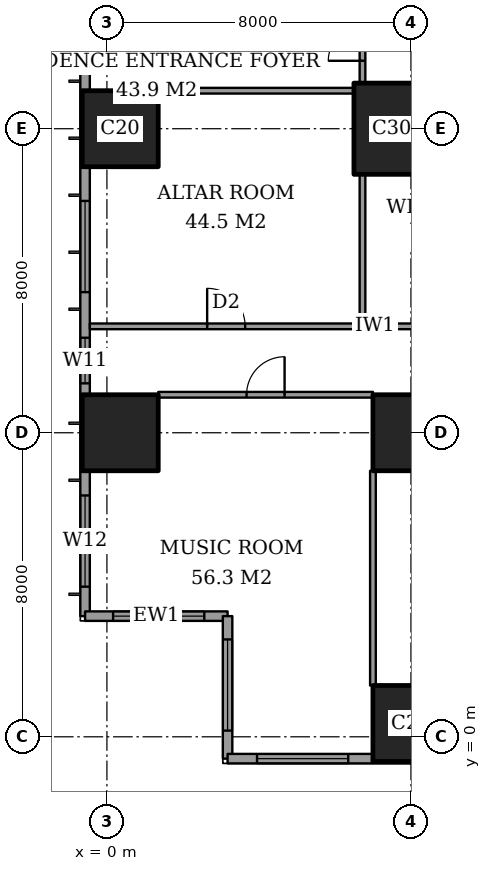
"""IFC4 building model, lengths in metres.
Left out: names, types, materials, properties, quantities, classifications, styles, units other than length and angle.
Written with IfcOpenShell. Run it as: python <this file> out.ifc"""

import sys

from ifc_helpers import new_model, si_unit, direction, frame, frame_2d, origin, origin_2d, place, context, subcontext, project, spatial, rectangle, extrude, element, fill, save


model = new_model("IFC4")
c1 = context("Model", 3, precision=1e-05, world=origin(), true_north=direction((0.0, 1.0)))
c2 = subcontext(c1, "Body", "Model", "MODEL_VIEW")
j1 = project(units=[si_unit("LENGTHUNIT", "METRE"), si_unit("PLANEANGLEUNIT", "RADIAN")], contexts=[c1])
p1 = place(None, origin())
s1 = spatial("IfcSite", under=j1, at=p1, CompositionType="ELEMENT")
p2 = place(p1, origin())
s2 = spatial("IfcBuilding", under=s1, at=p2, CompositionType="ELEMENT")
p3 = place(p2, frame((0.0, 0.0, 96.2)))
s3 = spatial("IfcBuildingStorey", under=s2, at=p3, CompositionType="ELEMENT", Elevation=96.2)
for number, where, z_axis, x_axis in (
    (1, (0.35, 8.0, 0.0), (0.0, 0.0, 1.0), (1.0, 0.0, 0.0)),
    (2, (0.35, 16.0, 0.0), (0.0, 0.0, 1.0), (1.0, 0.0, 0.0)),
    (3, (8.0, 0.35, 0.0), (0.0, 0.0, 1.0), (1.0, 0.0, 0.0)),
    (4, (8.0, 8.0, 0.0), (0.0, 0.0, 1.0), (1.0, 0.0, 0.0)),
):
    element("IfcColumn", number, at=place(p3, frame(where, z_axis=z_axis, x_axis=x_axis)), inside=s3, PredefinedType="COLUMN", context=c2, shape_type="SweptSolid", body=[
        extrude(rectangle(XDim=2.0, YDim=2.0, at=origin_2d()), origin(), (0.0, 0.0, 1.0), 3.6),
    ])
p4 = place(p3, frame((8.0, 16.0, 0.0), z_axis=(0.0, 0.0, 1.0), x_axis=(1.0, 0.0, 0.0)))
e5 = element("IfcColumn", 5, at=p4, inside=s3, PredefinedType="COLUMN", context=c2, shape_type="SweptSolid", body=[
    extrude(rectangle(XDim=3.0, YDim=2.4, at=origin_2d()), origin(), (0.0, 0.0, 1.0), 3.6),
])
p5 = place(p3, frame((-0.575, 44.825, 0.0), z_axis=(0.0, 0.0, 1.0), x_axis=(0.0, -1.0, 0.0)))
e6 = element("IfcWall", 6, at=p5, inside=s3, PredefinedType="SOLIDWALL", context=c2, shape_type="SweptSolid", body=[
    extrude(rectangle(XDim=41.65, YDim=0.25, at=frame_2d((20.825, 0.0))), origin(), (0.0, 0.0, 1.0), 3.6),
])
p6 = place(p5, frame((0.775, 0.0, 0.4)))
e7 = element("IfcOpeningElement", 7, at=p6, cuts=e6, PredefinedType="OPENING", context=c2, shape_type="SweptSolid", body=[
    extrude(rectangle(XDim=2.4, YDim=2.2, at=frame_2d((1.2, 1.1))), frame((0.0, 0.135, 0.0), z_axis=(0.0, -1.0, 0.0), x_axis=(1.0, 0.0, 0.0)), (0.0, 0.0, 1.0), 0.27),
])
p7 = place(p5, frame((6.1, 0.0, 0.4)))
e8 = element("IfcOpeningElement", 8, at=p7, cuts=e6, PredefinedType="OPENING", context=c2, shape_type="SweptSolid", body=[
    extrude(rectangle(XDim=1.2, YDim=2.2, at=frame_2d((0.6, 1.1))), frame((0.0, 0.135, 0.0), z_axis=(0.0, -1.0, 0.0), x_axis=(1.0, 0.0, 0.0)), (0.0, 0.0, 1.0), 0.27),
])
p8 = place(p5, frame((8.425, 0.0, 0.4)))
e9 = element("IfcOpeningElement", 9, at=p8, cuts=e6, PredefinedType="OPENING", context=c2, shape_type="SweptSolid", body=[
    extrude(rectangle(XDim=2.4, YDim=2.2, at=frame_2d((1.2, 1.1))), frame((0.0, 0.135, 0.0), z_axis=(0.0, -1.0, 0.0), x_axis=(1.0, 0.0, 0.0)), (0.0, 0.0, 1.0), 0.27),
])
p9 = place(p5, frame((15.625, 0.0, 0.4)))
e10 = element("IfcOpeningElement", 10, at=p9, cuts=e6, PredefinedType="OPENING", context=c2, shape_type="SweptSolid", body=[
    extrude(rectangle(XDim=2.4, YDim=2.2, at=frame_2d((1.2, 1.1))), frame((0.0, 0.135, 0.0), z_axis=(0.0, -1.0, 0.0), x_axis=(1.0, 0.0, 0.0)), (0.0, 0.0, 1.0), 0.27),
])
p10 = place(p5, frame((23.625, 0.0, 0.4)))
e11 = element("IfcOpeningElement", 11, at=p10, cuts=e6, PredefinedType="OPENING", context=c2, shape_type="SweptSolid", body=[
    extrude(rectangle(XDim=2.4, YDim=2.2, at=frame_2d((1.2, 1.1))), frame((0.0, 0.135, 0.0), z_axis=(0.0, -1.0, 0.0), x_axis=(1.0, 0.0, 0.0)), (0.0, 0.0, 1.0), 0.27),
])
p11 = place(p5, frame((30.725, 0.0, 0.4)))
e12 = element("IfcOpeningElement", 12, at=p11, cuts=e6, PredefinedType="OPENING", context=c2, shape_type="SweptSolid", body=[
    extrude(rectangle(XDim=2.4, YDim=2.2, at=frame_2d((1.2, 1.1))), frame((0.0, 0.135, 0.0), z_axis=(0.0, -1.0, 0.0), x_axis=(1.0, 0.0, 0.0)), (0.0, 0.0, 1.0), 0.27),
])
p12 = place(p5, frame((34.325, 0.0, 0.4)))
e13 = element("IfcOpeningElement", 13, at=p12, cuts=e6, PredefinedType="OPENING", context=c2, shape_type="SweptSolid", body=[
    extrude(rectangle(XDim=1.2, YDim=2.2, at=frame_2d((0.6, 1.1))), frame((0.0, 0.135, 0.0), z_axis=(0.0, -1.0, 0.0), x_axis=(1.0, 0.0, 0.0)), (0.0, 0.0, 1.0), 0.27),
])
p13 = place(p5, frame((38.475, 0.0, 0.4)))
e14 = element("IfcOpeningElement", 14, at=p13, cuts=e6, PredefinedType="OPENING", context=c2, shape_type="SweptSolid", body=[
    extrude(rectangle(XDim=2.4, YDim=2.2, at=frame_2d((1.2, 1.1))), frame((0.0, 0.135, 0.0), z_axis=(0.0, -1.0, 0.0), x_axis=(1.0, 0.0, 0.0)), (0.0, 0.0, 1.0), 0.27),
])
p14 = place(p3, frame((-0.575, 3.175, 0.0), z_axis=(0.0, 0.0, 1.0), x_axis=(1.0, 0.0, 0.0)))
e15 = element("IfcWall", 15, at=p14, inside=s3, PredefinedType="SOLIDWALL", context=c2, shape_type="SweptSolid", body=[
    extrude(rectangle(XDim=3.75, YDim=0.25, at=frame_2d((1.875, 0.0))), origin(), (0.0, 0.0, 1.0), 3.6),
])
p15 = place(p14, frame((0.738, 0.0, 0.4)))
e16 = element("IfcOpeningElement", 16, at=p15, cuts=e15, PredefinedType="OPENING", context=c2, shape_type="SweptSolid", body=[
    extrude(rectangle(XDim=2.4, YDim=2.2, at=frame_2d((1.2, 1.1))), frame((0.0, 0.135, 0.0), z_axis=(0.0, -1.0, 0.0), x_axis=(1.0, 0.0, 0.0)), (0.0, 0.0, 1.0), 0.27),
])
p16 = place(p3, frame((3.175, 3.175, 0.0), z_axis=(0.0, 0.0, 1.0), x_axis=(0.0, -1.0, 0.0)))
e17 = element("IfcWall", 17, at=p16, inside=s3, PredefinedType="SOLIDWALL", context=c2, shape_type="SweptSolid", body=[
    extrude(rectangle(XDim=3.75, YDim=0.25, at=frame_2d((1.875, 0.0))), origin(), (0.0, 0.0, 1.0), 3.6),
])
p17 = place(p16, frame((0.613, 0.0, 0.4)))
e18 = element("IfcOpeningElement", 18, at=p17, cuts=e17, PredefinedType="OPENING", context=c2, shape_type="SweptSolid", body=[
    extrude(rectangle(XDim=2.4, YDim=2.2, at=frame_2d((1.2, 1.1))), frame((0.0, 0.135, 0.0), z_axis=(0.0, -1.0, 0.0), x_axis=(1.0, 0.0, 0.0)), (0.0, 0.0, 1.0), 0.27),
])
p18 = place(p3, frame((3.175, -0.575, 0.0), z_axis=(0.0, 0.0, 1.0), x_axis=(1.0, 0.0, 0.0)))
e19 = element("IfcWall", 19, at=p18, inside=s3, PredefinedType="SOLIDWALL", context=c2, shape_type="SweptSolid", body=[
    extrude(rectangle(XDim=21.4, YDim=0.25, at=frame_2d((10.7, 0.0))), origin(), (0.0, 0.0, 1.0), 3.6),
])
p19 = place(p18, frame((0.775, 0.0, 0.4)))
e20 = element("IfcOpeningElement", 20, at=p19, cuts=e19, PredefinedType="OPENING", context=c2, shape_type="SweptSolid", body=[
    extrude(rectangle(XDim=2.4, YDim=2.2, at=frame_2d((1.2, 1.1))), frame((0.0, 0.135, 0.0), z_axis=(0.0, -1.0, 0.0), x_axis=(1.0, 0.0, 0.0)), (0.0, 0.0, 1.0), 0.27),
])
p20 = place(p18, frame((7.125, 0.0, 0.4)))
e21 = element("IfcOpeningElement", 21, at=p20, cuts=e19, PredefinedType="OPENING", context=c2, shape_type="SweptSolid", body=[
    extrude(rectangle(XDim=2.4, YDim=2.2, at=frame_2d((1.2, 1.1))), frame((0.0, 0.135, 0.0), z_axis=(0.0, -1.0, 0.0), x_axis=(1.0, 0.0, 0.0)), (0.0, 0.0, 1.0), 0.27),
])
p21 = place(p18, frame((14.225, 0.0, 0.4)))
e22 = element("IfcOpeningElement", 22, at=p21, cuts=e19, PredefinedType="OPENING", context=c2, shape_type="SweptSolid", body=[
    extrude(rectangle(XDim=1.2, YDim=2.2, at=frame_2d((0.6, 1.1))), frame((0.0, 0.135, 0.0), z_axis=(0.0, -1.0, 0.0), x_axis=(1.0, 0.0, 0.0)), (0.0, 0.0, 1.0), 0.27),
])
p22 = place(p18, frame((16.1, 0.0, 0.4)))
e23 = element("IfcOpeningElement", 23, at=p22, cuts=e19, PredefinedType="OPENING", context=c2, shape_type="SweptSolid", body=[
    extrude(rectangle(XDim=1.2, YDim=2.2, at=frame_2d((0.6, 1.1))), frame((0.0, 0.135, 0.0), z_axis=(0.0, -1.0, 0.0), x_axis=(1.0, 0.0, 0.0)), (0.0, 0.0, 1.0), 0.27),
])
p23 = place(p18, frame((17.85, 0.0, 0.4)))
e24 = element("IfcOpeningElement", 24, at=p23, cuts=e19, PredefinedType="OPENING", context=c2, shape_type="SweptSolid", body=[
    extrude(rectangle(XDim=1.2, YDim=2.2, at=frame_2d((0.6, 1.1))), frame((0.0, 0.135, 0.0), z_axis=(0.0, -1.0, 0.0), x_axis=(1.0, 0.0, 0.0)), (0.0, 0.0, 1.0), 0.27),
])
p24 = place(p3, frame((1.35, 9.0, 0.0), z_axis=(0.0, 0.0, 1.0), x_axis=(1.0, 0.0, 0.0)))
e25 = element("IfcWall", 25, at=p24, inside=s3, PredefinedType="PARTITIONING", context=c2, shape_type="SweptSolid", body=[
    extrude(rectangle(XDim=5.65, YDim=0.15, at=frame_2d((2.825, 0.0))), origin(), (0.0, 0.0, 1.0), 3.35),
])
p25 = place(p24, frame((2.325, 0.0, 0.0)))
e26 = element("IfcOpeningElement", 26, at=p25, cuts=e25, PredefinedType="OPENING", context=c2, shape_type="SweptSolid", body=[
    extrude(rectangle(XDim=1.0, YDim=2.1, at=frame_2d((0.5, 1.05))), frame((0.0, 0.085, 0.0), z_axis=(0.0, -1.0, 0.0), x_axis=(1.0, 0.0, 0.0)), (0.0, 0.0, 1.0), 0.17),
])
p26 = place(p3, frame((-0.45, 10.8, 0.0), z_axis=(0.0, 0.0, 1.0), x_axis=(1.0, 0.0, 0.0)))
e27 = element("IfcWall", 27, at=p26, inside=s3, PredefinedType="PARTITIONING", context=c2, shape_type="SweptSolid", body=[
    extrude(rectangle(XDim=25.011, YDim=0.15, at=frame_2d((12.505, 0.0))), origin(), (0.0, 0.0, 1.0), 3.35),
])
p27 = place(p26, frame((12.05, 0.0, 0.0)))
e28 = element("IfcOpeningElement", 28, at=p27, cuts=e27, PredefinedType="OPENING", context=c2, shape_type="SweptSolid", body=[
    extrude(rectangle(XDim=1.0, YDim=2.1, at=frame_2d((0.5, 1.05))), frame((0.0, 0.085, 0.0), z_axis=(0.0, -1.0, 0.0), x_axis=(1.0, 0.0, 0.0)), (0.0, 0.0, 1.0), 0.17),
])
p28 = place(p26, frame((3.087, 0.0, 0.0)))
e29 = element("IfcOpeningElement", 29, at=p28, cuts=e27, PredefinedType="OPENING", context=c2, shape_type="SweptSolid", body=[
    extrude(rectangle(XDim=1.0, YDim=2.1, at=frame_2d((0.5, 1.05))), frame((0.0, 0.085, 0.0), z_axis=(0.0, -1.0, 0.0), x_axis=(1.0, 0.0, 0.0)), (0.0, 0.0, 1.0), 0.17),
])
p29 = place(p26, frame((8.863, 0.0, 0.0)))
e30 = element("IfcOpeningElement", 30, at=p29, cuts=e27, PredefinedType="OPENING", context=c2, shape_type="SweptSolid", body=[
    extrude(rectangle(XDim=0.9, YDim=2.1, at=frame_2d((0.45, 1.05))), frame((0.0, 0.085, 0.0), z_axis=(0.0, -1.0, 0.0), x_axis=(1.0, 0.0, 0.0)), (0.0, 0.0, 1.0), 0.17),
])
p30 = place(p26, frame((14.45, 0.0, 0.0)))
e31 = element("IfcOpeningElement", 31, at=p30, cuts=e27, PredefinedType="OPENING", context=c2, shape_type="SweptSolid", body=[
    extrude(rectangle(XDim=1.0, YDim=2.1, at=frame_2d((0.5, 1.05))), frame((0.0, 0.085, 0.0), z_axis=(0.0, -1.0, 0.0), x_axis=(1.0, 0.0, 0.0)), (0.0, 0.0, 1.0), 0.17),
])
p31 = place(p26, frame((16.9, 0.0, 0.0)))
e32 = element("IfcOpeningElement", 32, at=p31, cuts=e27, PredefinedType="OPENING", context=c2, shape_type="SweptSolid", body=[
    extrude(rectangle(XDim=0.9, YDim=2.1, at=frame_2d((0.45, 1.05))), frame((0.0, 0.085, 0.0), z_axis=(0.0, -1.0, 0.0), x_axis=(1.0, 0.0, 0.0)), (0.0, 0.0, 1.0), 0.17),
])
p32 = place(p26, frame((21.175, 0.0, 0.0)))
e33 = element("IfcOpeningElement", 33, at=p32, cuts=e27, PredefinedType="OPENING", context=c2, shape_type="SweptSolid", body=[
    extrude(rectangle(XDim=1.0, YDim=2.1, at=frame_2d((0.5, 1.05))), frame((0.0, 0.085, 0.0), z_axis=(0.0, -1.0, 0.0), x_axis=(1.0, 0.0, 0.0)), (0.0, 0.0, 1.0), 0.17),
])
p33 = place(p3, frame((1.35, 17.0, 0.0), z_axis=(0.0, 0.0, 1.0), x_axis=(1.0, 0.0, 0.0)))
e34 = element("IfcWall", 34, at=p33, inside=s3, PredefinedType="PARTITIONING", context=c2, shape_type="SweptSolid", body=[
    extrude(rectangle(XDim=5.15, YDim=0.15, at=frame_2d((2.575, 0.0))), origin(), (0.0, 0.0, 1.0), 3.35),
])
p34 = place(p3, frame((6.725, 10.8, 0.0), z_axis=(0.0, 0.0, 1.0), x_axis=(0.0, 1.0, 0.0)))
e35 = element("IfcWall", 35, at=p34, inside=s3, PredefinedType="PARTITIONING", context=c2, shape_type="SweptSolid", body=[
    extrude(rectangle(XDim=4.0, YDim=0.15, at=frame_2d((2.0, 0.0))), origin(), (0.0, 0.0, 1.0), 3.35),
])
p35 = place(p3, frame((6.725, 17.2, 0.0), z_axis=(0.0, 0.0, 1.0), x_axis=(0.0, 1.0, 0.0)))
e36 = element("IfcWall", 36, at=p35, inside=s3, PredefinedType="PARTITIONING", context=c2, shape_type="SweptSolid", body=[
    extrude(rectangle(XDim=2.45, YDim=0.15, at=frame_2d((1.225, 0.0))), origin(), (0.0, 0.0, 1.0), 3.35),
])
p36 = place(p35, frame((0.587, 0.0, 0.0)))
e37 = element("IfcOpeningElement", 37, at=p36, cuts=e36, PredefinedType="OPENING", context=c2, shape_type="SweptSolid", body=[
    extrude(rectangle(XDim=0.9, YDim=2.1, at=frame_2d((0.45, 1.05))), frame((0.0, 0.085, 0.0), z_axis=(0.0, -1.0, 0.0), x_axis=(1.0, 0.0, 0.0)), (0.0, 0.0, 1.0), 0.17),
])
p37 = place(p3, frame((7.0, 1.35, 0.0), z_axis=(0.0, 0.0, 1.0), x_axis=(0.0, 1.0, 0.0)))
e38 = element("IfcWall", 38, at=p37, inside=s3, PredefinedType="PARTITIONING", context=c2, shape_type="SweptSolid", body=[
    extrude(rectangle(XDim=5.65, YDim=0.15, at=frame_2d((2.825, 0.0))), origin(), (0.0, 0.0, 1.0), 3.35),
])
p38 = place(p11, origin())
e39 = element("IfcWindow", 39, at=p38, inside=s3, PartitioningType="SINGLE_PANEL", PredefinedType="WINDOW", context=c2, shape_type="SweptSolid", body=[
    extrude(rectangle(XDim=2.4, YDim=2.2, at=frame_2d((1.2, 1.1))), frame((0.0, 0.03, 0.0), z_axis=(0.0, -1.0, 0.0), x_axis=(1.0, 0.0, 0.0)), (0.0, 0.0, 1.0), 0.06),
])
fill(e12, e39)
p39 = place(p12, origin())
e40 = element("IfcWindow", 40, at=p39, inside=s3, PartitioningType="SINGLE_PANEL", PredefinedType="WINDOW", context=c2, shape_type="SweptSolid", body=[
    extrude(rectangle(XDim=1.2, YDim=2.2, at=frame_2d((0.6, 1.1))), frame((0.0, 0.03, 0.0), z_axis=(0.0, -1.0, 0.0), x_axis=(1.0, 0.0, 0.0)), (0.0, 0.0, 1.0), 0.06),
])
fill(e13, e40)
p40 = place(p13, origin())
e41 = element("IfcWindow", 41, at=p40, inside=s3, PartitioningType="SINGLE_PANEL", PredefinedType="WINDOW", context=c2, shape_type="SweptSolid", body=[
    extrude(rectangle(XDim=2.4, YDim=2.2, at=frame_2d((1.2, 1.1))), frame((0.0, 0.03, 0.0), z_axis=(0.0, -1.0, 0.0), x_axis=(1.0, 0.0, 0.0)), (0.0, 0.0, 1.0), 0.06),
])
fill(e14, e41)
p41 = place(p15, origin())
e42 = element("IfcWindow", 42, at=p41, inside=s3, PartitioningType="SINGLE_PANEL", PredefinedType="WINDOW", context=c2, shape_type="SweptSolid", body=[
    extrude(rectangle(XDim=2.4, YDim=2.2, at=frame_2d((1.2, 1.1))), frame((0.0, 0.03, 0.0), z_axis=(0.0, -1.0, 0.0), x_axis=(1.0, 0.0, 0.0)), (0.0, 0.0, 1.0), 0.06),
])
fill(e16, e42)
p42 = place(p17, origin())
e43 = element("IfcWindow", 43, at=p42, inside=s3, PartitioningType="SINGLE_PANEL", PredefinedType="WINDOW", context=c2, shape_type="SweptSolid", body=[
    extrude(rectangle(XDim=2.4, YDim=2.2, at=frame_2d((1.2, 1.1))), frame((0.0, 0.03, 0.0), z_axis=(0.0, -1.0, 0.0), x_axis=(1.0, 0.0, 0.0)), (0.0, 0.0, 1.0), 0.06),
])
fill(e18, e43)
p43 = place(p19, origin())
e44 = element("IfcWindow", 44, at=p43, inside=s3, PartitioningType="SINGLE_PANEL", PredefinedType="WINDOW", context=c2, shape_type="SweptSolid", body=[
    extrude(rectangle(XDim=2.4, YDim=2.2, at=frame_2d((1.2, 1.1))), frame((0.0, 0.03, 0.0), z_axis=(0.0, -1.0, 0.0), x_axis=(1.0, 0.0, 0.0)), (0.0, 0.0, 1.0), 0.06),
])
fill(e20, e44)
p44 = place(p25, origin())
e45 = element("IfcDoor", 45, at=p44, inside=s3, OperationType="SINGLE_SWING_LEFT", PredefinedType="DOOR", context=c2, shape_type="SweptSolid", body=[
    extrude(rectangle(XDim=1.0, YDim=2.1, at=frame_2d((0.5, 1.05))), frame((0.0, 0.025, 0.0), z_axis=(0.0, -1.0, 0.0), x_axis=(1.0, 0.0, 0.0)), (0.0, 0.0, 1.0), 0.05),
])
fill(e26, e45)
p45 = place(p28, origin())
e46 = element("IfcDoor", 46, at=p45, inside=s3, OperationType="SINGLE_SWING_RIGHT", PredefinedType="DOOR", context=c2, shape_type="SweptSolid", body=[
    extrude(rectangle(XDim=1.0, YDim=2.1, at=frame_2d((0.5, 1.05))), frame((0.0, 0.025, 0.0), z_axis=(0.0, -1.0, 0.0), x_axis=(1.0, 0.0, 0.0)), (0.0, 0.0, 1.0), 0.05),
])
fill(e29, e46)
p46 = place(p36, origin())
e47 = element("IfcDoor", 47, at=p46, inside=s3, OperationType="SINGLE_SWING_RIGHT", PredefinedType="DOOR", context=c2, shape_type="SweptSolid", body=[
    extrude(rectangle(XDim=0.9, YDim=2.1, at=frame_2d((0.45, 1.05))), frame((0.0, 0.025, 0.0), z_axis=(0.0, -1.0, 0.0), x_axis=(1.0, 0.0, 0.0)), (0.0, 0.0, 1.0), 0.05),
])
fill(e37, e47)
save(model, sys.argv[1])
